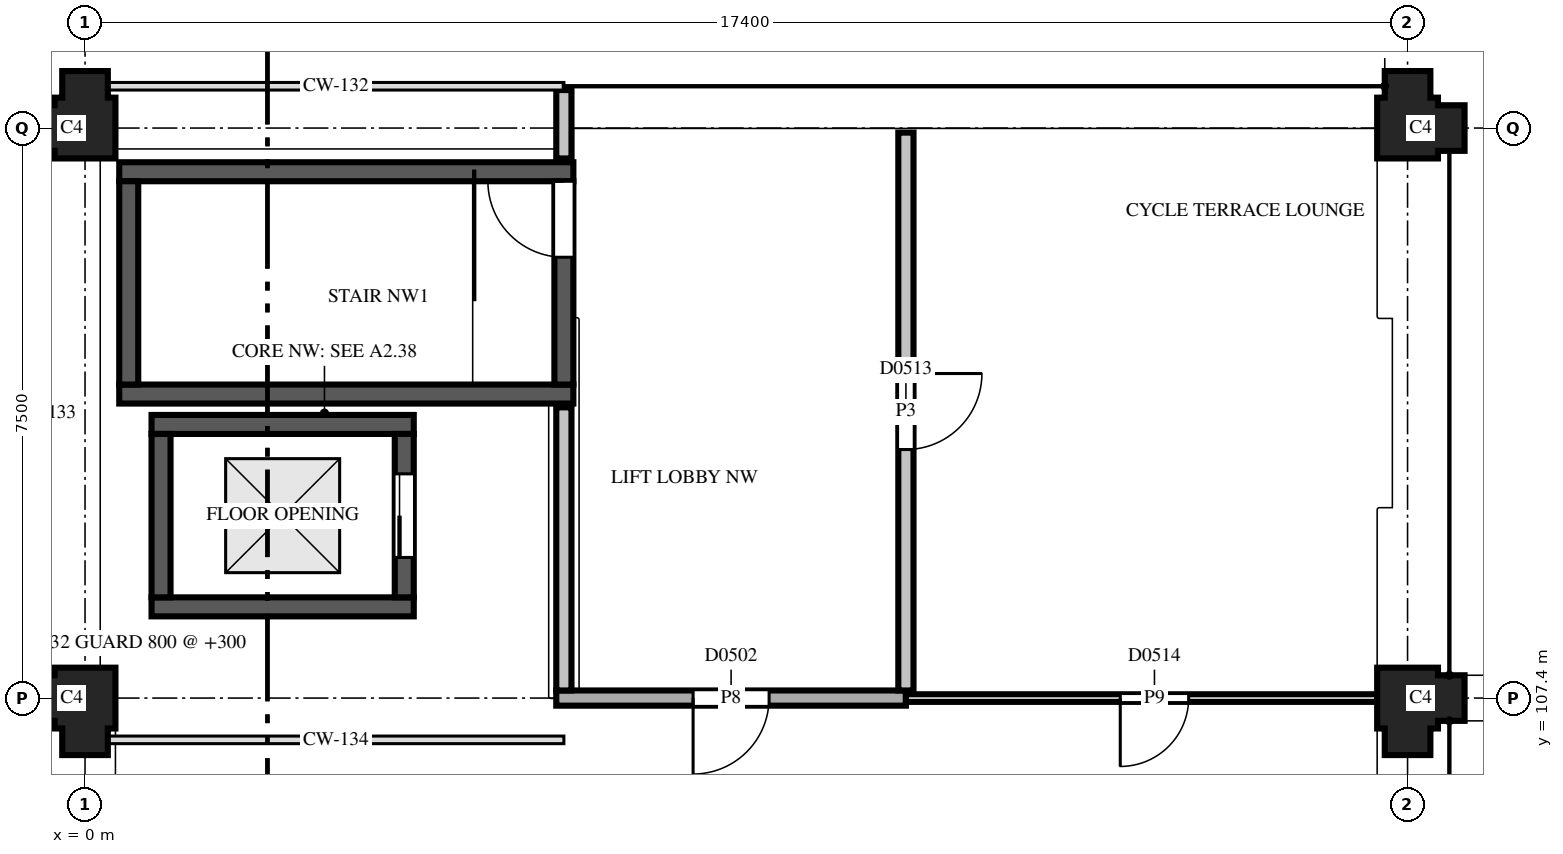
"""IFC4 building model, lengths in metres.
Left out: names, types, materials, properties, quantities, classifications, styles, units other than length and angle.
Written with IfcOpenShell. Run it as: python <this file> out.ifc"""

import sys

from ifc_helpers import new_model, si_unit, direction, frame, frame_2d, origin, place, context, subcontext, project, spatial, polyline, rectangle, outline, extrude, element, fill, save


model = new_model("IFC4")
c1 = context("Model", 3, precision=1e-05, world=origin(), true_north=direction((0.0, 1.0)))
c2 = subcontext(c1, "Body", "Model", "MODEL_VIEW")
j1 = project(units=[si_unit("LENGTHUNIT", "METRE"), si_unit("PLANEANGLEUNIT", "RADIAN")], contexts=[c1])
p1 = place(None, origin())
s1 = spatial("IfcSite", under=j1, at=p1, CompositionType="ELEMENT")
p2 = place(p1, origin())
s2 = spatial("IfcBuilding", under=s1, at=p2, CompositionType="ELEMENT")
p3 = place(p2, frame((0.0, 0.0, 19.3)))
s3 = spatial("IfcBuildingStorey", under=s2, at=p3, CompositionType="ELEMENT", Elevation=19.3)
for number, where, z_axis, x_axis in (
    (1, (0.0, 107.4, 0.0), (0.0, 0.0, 1.0), (-1.0, 0.0, 0.0)),
    (2, (17.4, 107.4, 0.0), (0.0, 0.0, 1.0), (0.0, -1.0, 0.0)),
    (3, (0.0, 114.9, 0.0), (0.0, 0.0, 1.0), (0.0, 1.0, 0.0)),
    (4, (17.4, 114.9, 0.0), (0.0, 0.0, 1.0), (1.0, 0.0, 0.0)),
):
    element("IfcColumn", number, at=place(p3, frame(where, z_axis=z_axis, x_axis=x_axis)), inside=s3, PredefinedType="COLUMN", context=c2, shape_type="SweptSolid", body=[
        extrude(outline(polyline([(-0.4, -0.4), (0.4, -0.4), (0.4, -0.3), (0.75, -0.3), (0.75, 0.3), (0.4, 0.3), (0.4, 0.4), (0.3, 0.4), (0.3, 0.75), (-0.3, 0.75), (-0.3, 0.4), (-0.4, 0.4), (-0.4, -0.4)])), origin(), (0.0, 0.0, 1.0), 3.7),
    ])
for number, where, z_axis, x_axis in (
    (5, (0.875, 108.6, 0.0), (0.0, 0.0, 1.0), (1.0, 0.0, 0.0)),
    (6, (0.875, 111.0, 0.0), (0.0, 0.0, 1.0), (1.0, 0.0, 0.0)),
):
    element("IfcWall", number, at=place(p3, frame(where, z_axis=z_axis, x_axis=x_axis)), inside=s3, PredefinedType="SHEAR", context=c2, shape_type="SweptSolid", body=[
        extrude(rectangle(XDim=3.45, YDim=0.25, at=frame_2d((1.725, 0.0))), origin(), (0.0, 0.0, 1.0), 3.35),
    ])
for number, where, z_axis, x_axis in (
    (7, (0.45, 111.4, 0.0), (0.0, 0.0, 1.0), (1.0, 0.0, 0.0)),
    (8, (0.45, 114.325, 0.0), (0.0, 0.0, 1.0), (1.0, 0.0, 0.0)),
):
    element("IfcWall", number, at=place(p3, frame(where, z_axis=z_axis, x_axis=x_axis)), inside=s3, PredefinedType="SHEAR", context=c2, shape_type="SweptSolid", body=[
        extrude(rectangle(XDim=5.975, YDim=0.25, at=frame_2d((2.988, 0.0))), origin(), (0.0, 0.0, 1.0), 3.35),
    ])
p4 = place(p3, frame((0.575, 111.525, 0.0), z_axis=(0.0, 0.0, 1.0), x_axis=(0.0, 1.0, 0.0)))
e9 = element("IfcWall", 9, at=p4, inside=s3, PredefinedType="SHEAR", context=c2, shape_type="SweptSolid", body=[
    extrude(rectangle(XDim=2.675, YDim=0.25, at=frame_2d((1.337, 0.0))), origin(), (0.0, 0.0, 1.0), 3.35),
])
p5 = place(p3, frame((1.0, 108.725, 0.0), z_axis=(0.0, 0.0, 1.0), x_axis=(0.0, 1.0, 0.0)))
e10 = element("IfcWall", 10, at=p5, inside=s3, PredefinedType="SHEAR", context=c2, shape_type="SweptSolid", body=[
    extrude(rectangle(XDim=2.15, YDim=0.25, at=frame_2d((1.075, 0.0))), origin(), (0.0, 0.0, 1.0), 3.35),
])
p6 = place(p3, frame((4.2, 108.725, 0.0), z_axis=(0.0, 0.0, 1.0), x_axis=(0.0, 1.0, 0.0)))
e11 = element("IfcWall", 11, at=p6, inside=s3, PredefinedType="SHEAR", context=c2, shape_type="SweptSolid", body=[
    extrude(rectangle(XDim=2.15, YDim=0.25, at=frame_2d((1.075, 0.0))), origin(), (0.0, 0.0, 1.0), 3.35),
])
p7 = place(p6, frame((0.525, 0.0, 0.0)))
e12 = element("IfcOpeningElement", 12, at=p7, cuts=e11, PredefinedType="OPENING", context=c2, shape_type="SweptSolid", body=[
    extrude(rectangle(XDim=1.1, YDim=2.1, at=frame_2d((0.55, 1.05))), frame((0.0, 0.135, 0.0), z_axis=(0.0, -1.0, 0.0), x_axis=(1.0, 0.0, 0.0)), (0.0, 0.0, 1.0), 0.27),
])
p8 = place(p3, frame((6.3, 111.525, 0.0), z_axis=(0.0, 0.0, 1.0), x_axis=(0.0, 1.0, 0.0)))
e13 = element("IfcWall", 13, at=p8, inside=s3, PredefinedType="SHEAR", context=c2, shape_type="SweptSolid", body=[
    extrude(rectangle(XDim=2.675, YDim=0.25, at=frame_2d((1.337, 0.0))), origin(), (0.0, 0.0, 1.0), 3.35),
])
p9 = place(p8, frame((1.675, 0.0, 0.0)))
e14 = element("IfcOpeningElement", 14, at=p9, cuts=e13, PredefinedType="OPENING", context=c2, shape_type="SweptSolid", body=[
    extrude(rectangle(XDim=1.0, YDim=2.1, at=frame_2d((0.5, 1.05))), frame((0.0, 0.135, 0.0), z_axis=(0.0, -1.0, 0.0), x_axis=(1.0, 0.0, 0.0)), (0.0, 0.0, 1.0), 0.27),
])
p10 = place(p3, frame((6.2, 107.4, 0.0), z_axis=(0.0, 0.0, 1.0), x_axis=(1.0, 0.0, 0.0)))
e15 = element("IfcWall", 15, at=p10, inside=s3, PredefinedType="PARTITIONING", context=c2, shape_type="SweptSolid", body=[
    extrude(rectangle(XDim=4.6, YDim=0.2, at=frame_2d((2.3, 0.0))), origin(), (0.0, 0.0, 1.0), 2.0),
])
p11 = place(p10, frame((1.8, 0.0, 0.0)))
e16 = element("IfcOpeningElement", 16, at=p11, cuts=e15, PredefinedType="OPENING", context=c2, shape_type="SweptSolid", body=[
    extrude(rectangle(XDim=1.0, YDim=2.0, at=frame_2d((0.5, 1.0))), frame((0.0, 0.11, 0.0), z_axis=(0.0, -1.0, 0.0), x_axis=(1.0, 0.0, 0.0)), (0.0, 0.0, 1.0), 0.22),
])
p12 = place(p3, frame((10.8, 107.4, 0.0), z_axis=(0.0, 0.0, 1.0), x_axis=(1.0, 0.0, 0.0)))
e17 = element("IfcWall", 17, at=p12, inside=s3, PredefinedType="PARTITIONING", context=c2, shape_type="SweptSolid", body=[
    extrude(rectangle(XDim=6.54, YDim=0.1, at=frame_2d((3.27, 0.0))), origin(), (0.0, 0.0, 1.0), 2.0),
])
p13 = place(p12, frame((2.82, 0.0, 0.0)))
e18 = element("IfcOpeningElement", 18, at=p13, cuts=e17, PredefinedType="OPENING", context=c2, shape_type="SweptSolid", body=[
    extrude(rectangle(XDim=0.9, YDim=2.0, at=frame_2d((0.45, 1.0))), frame((0.0, 0.06, 0.0), z_axis=(0.0, -1.0, 0.0), x_axis=(1.0, 0.0, 0.0)), (0.0, 0.0, 1.0), 0.12),
])
p14 = place(p3, frame((10.8, 107.5, 0.0), z_axis=(0.0, 0.0, 1.0), x_axis=(0.0, 1.0, 0.0)))
e19 = element("IfcWall", 19, at=p14, inside=s3, PredefinedType="PARTITIONING", context=c2, shape_type="SweptSolid", body=[
    extrude(rectangle(XDim=7.34, YDim=0.2, at=frame_2d((3.67, 0.0))), origin(), (0.0, 0.0, 1.0), 2.88),
])
p15 = place(p14, frame((3.17, 0.0, 0.0)))
e20 = element("IfcOpeningElement", 20, at=p15, cuts=e19, PredefinedType="OPENING", context=c2, shape_type="SweptSolid", body=[
    extrude(rectangle(XDim=1.0, YDim=2.1, at=frame_2d((0.5, 1.05))), frame((0.0, 0.11, 0.0), z_axis=(0.0, -1.0, 0.0), x_axis=(1.0, 0.0, 0.0)), (0.0, 0.0, 1.0), 0.22),
])
p16 = place(p3, frame((6.3, 111.225, 0.0), z_axis=(0.0, 0.0, 1.0), x_axis=(0.0, -1.0, 0.0)))
e21 = element("IfcWall", 21, at=p16, inside=s3, PredefinedType="PARTITIONING", context=c2, shape_type="SweptSolid", body=[
    extrude(rectangle(XDim=3.725, YDim=0.2, at=frame_2d((1.863, 0.0))), origin(), (0.0, 0.0, 1.0), 2.88),
])
p17 = place(p3, frame((6.3, 115.4, 0.0), z_axis=(0.0, 0.0, 1.0), x_axis=(0.0, -1.0, 0.0)))
e22 = element("IfcWall", 22, at=p17, inside=s3, PredefinedType="PARTITIONING", context=c2, shape_type="SweptSolid", body=[
    extrude(rectangle(XDim=0.9, YDim=0.2, at=frame_2d((0.45, 0.0))), origin(), (0.0, 0.0, 1.0), 2.88),
])
p18 = place(p11, frame((1.0, 0.0, 0.0), z_axis=(0.0, 0.0, 1.0), x_axis=(-1.0, 0.0, 0.0)))
e23 = element("IfcDoor", 23, at=p18, inside=s3, OperationType="SINGLE_SWING_LEFT", PredefinedType="DOOR", context=c2, shape_type="SweptSolid", body=[
    extrude(rectangle(XDim=1.0, YDim=2.0, at=frame_2d((0.5, 1.0))), frame((0.0, 0.025, 0.0), z_axis=(0.0, -1.0, 0.0), x_axis=(1.0, 0.0, 0.0)), (0.0, 0.0, 1.0), 0.05),
])
fill(e16, e23)
p19 = place(p15, origin())
e24 = element("IfcDoor", 24, at=p19, inside=s3, OperationType="SINGLE_SWING_RIGHT", PredefinedType="DOOR", context=c2, shape_type="SweptSolid", body=[
    extrude(rectangle(XDim=1.0, YDim=2.1, at=frame_2d((0.5, 1.05))), frame((0.0, 0.025, 0.0), z_axis=(0.0, -1.0, 0.0), x_axis=(1.0, 0.0, 0.0)), (0.0, 0.0, 1.0), 0.05),
])
fill(e20, e24)
p20 = place(p13, frame((0.9, 0.0, 0.0), z_axis=(0.0, 0.0, 1.0), x_axis=(-1.0, 0.0, 0.0)))
e25 = element("IfcDoor", 25, at=p20, inside=s3, OperationType="SINGLE_SWING_LEFT", PredefinedType="DOOR", context=c2, shape_type="SweptSolid", body=[
    extrude(rectangle(XDim=0.9, YDim=2.0, at=frame_2d((0.45, 1.0))), frame((0.0, 0.025, 0.0), z_axis=(0.0, -1.0, 0.0), x_axis=(1.0, 0.0, 0.0)), (0.0, 0.0, 1.0), 0.05),
])
fill(e18, e25)
p21 = place(p7, origin())
e26 = element("IfcDoor", 26, at=p21, inside=s3, OperationType="SLIDING_TO_LEFT", PredefinedType="DOOR", context=c2, shape_type="SweptSolid", body=[
    extrude(rectangle(XDim=1.1, YDim=2.1, at=frame_2d((0.55, 1.05))), frame((0.0, 0.025, 0.0), z_axis=(0.0, -1.0, 0.0), x_axis=(1.0, 0.0, 0.0)), (0.0, 0.0, 1.0), 0.05),
])
fill(e12, e26)
p22 = place(p9, origin())
e27 = element("IfcDoor", 27, at=p22, inside=s3, OperationType="SINGLE_SWING_LEFT", PredefinedType="DOOR", context=c2, shape_type="SweptSolid", body=[
    extrude(rectangle(XDim=1.0, YDim=2.1, at=frame_2d((0.5, 1.05))), frame((0.0, 0.025, 0.0), z_axis=(0.0, -1.0, 0.0), x_axis=(1.0, 0.0, 0.0)), (0.0, 0.0, 1.0), 0.05),
])
fill(e14, e27)
save(model, sys.argv[1])
